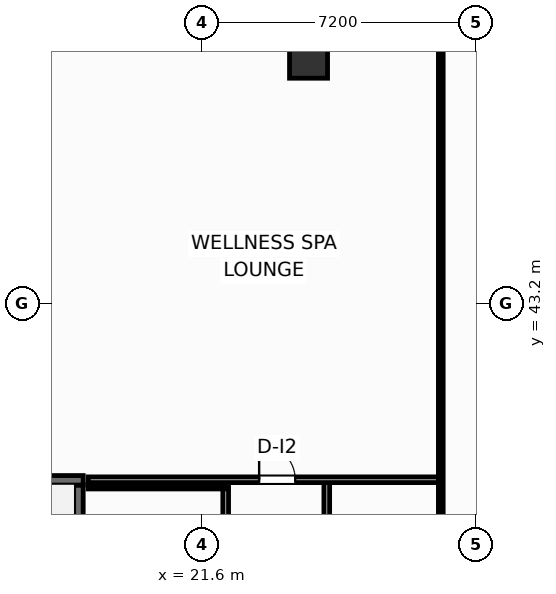
"""IFC4 building model, lengths in metres.
Left out: names, types, materials, properties, quantities, classifications, styles, units other than length and angle.
Written with IfcOpenShell. Run it as: python <this file> out.ifc"""

import sys

from ifc_helpers import new_model, si_unit, direction, frame, frame_2d, origin, origin_2d, place, context, subcontext, project, spatial, rectangle, extrude, element, fill, save


model = new_model("IFC4")
c1 = context("Model", 3, precision=1e-05, world=origin(), true_north=direction((0.0, 1.0)))
c2 = subcontext(c1, "Body", "Model", "MODEL_VIEW")
j1 = project(units=[si_unit("LENGTHUNIT", "METRE"), si_unit("PLANEANGLEUNIT", "RADIAN")], contexts=[c1])
p1 = place(None, origin())
s1 = spatial("IfcSite", under=j1, at=p1, CompositionType="ELEMENT")
p2 = place(p1, origin())
s2 = spatial("IfcBuilding", under=s1, at=p2, CompositionType="ELEMENT")
p3 = place(p2, frame((0.0, 0.0, 16.2)))
s3 = spatial("IfcBuildingStorey", under=s2, at=p3, CompositionType="ELEMENT", Elevation=16.2)
p4 = place(p3, frame((18.345, 29.2, 0.0), z_axis=(0.0, 0.0, 1.0), x_axis=(0.0, 1.0, 0.0)))
e1 = element("IfcWall", 1, at=p4, inside=s3, PredefinedType="SHEAR", context=c2, shape_type="SweptSolid", body=[
    extrude(rectangle(XDim=9.22, YDim=0.25, at=frame_2d((4.61, 0.0))), origin(), (0.0, 0.0, 1.0), 5.08),
])
p5 = place(p4, frame((0.65, 0.0, 0.0)))
e2 = element("IfcOpeningElement", 2, at=p5, cuts=e1, PredefinedType="OPENING", context=c2, shape_type="SweptSolid", body=[
    extrude(rectangle(XDim=1.05, YDim=2.15, at=frame_2d((0.525, 1.075))), frame((0.0, 0.135, 0.0), z_axis=(0.0, -1.0, 0.0), x_axis=(1.0, 0.0, 0.0)), (0.0, 0.0, 1.0), 0.27),
])
p6 = place(p3, frame((14.58, 38.545, 0.0), z_axis=(0.0, 0.0, 1.0), x_axis=(1.0, 0.0, 0.0)))
e3 = element("IfcWall", 3, at=p6, inside=s3, PredefinedType="SHEAR", context=c2, shape_type="SweptSolid", body=[
    extrude(rectangle(XDim=3.89, YDim=0.25, at=frame_2d((1.945, 0.0))), origin(), (0.0, 0.0, 1.0), 5.08),
])
p7 = place(p3, frame((24.4, 49.8, 0.0), z_axis=(0.0, 0.0, 1.0), x_axis=(1.0, 0.0, 0.0)))
e4 = element("IfcColumn", 4, at=p7, inside=s3, PredefinedType="COLUMN", context=c2, shape_type="SweptSolid", body=[
    extrude(rectangle(XDim=1.0, YDim=1.35, at=origin_2d()), origin(), (0.0, 0.0, 1.0), 5.4),
])
p8 = place(p3, frame((24.88, 28.98, 0.0), z_axis=(0.0, 0.0, 1.0), x_axis=(0.0, 1.0, 0.0)))
e5 = element("IfcWall", 5, at=p8, inside=s3, PredefinedType="PARTITIONING", context=c2, shape_type="SweptSolid", body=[
    extrude(rectangle(XDim=9.58, YDim=0.15, at=frame_2d((4.79, 0.0))), origin(), (0.0, 0.0, 1.0), 5.08),
])
p9 = place(p3, frame((22.22, 29.08, 0.0), z_axis=(0.0, 0.0, 1.0), x_axis=(0.0, 1.0, 0.0)))
e6 = element("IfcWall", 6, at=p9, inside=s3, PredefinedType="PARTITIONING", context=c2, shape_type="SweptSolid", body=[
    extrude(rectangle(XDim=9.3, YDim=0.15, at=frame_2d((4.65, 0.0))), origin(), (0.0, 0.0, 1.0), 5.08),
])
p10 = place(p9, frame((1.0, 0.0, 0.0)))
e7 = element("IfcOpeningElement", 7, at=p10, cuts=e6, PredefinedType="OPENING", context=c2, shape_type="SweptSolid", body=[
    extrude(rectangle(XDim=0.9, YDim=2.05, at=frame_2d((0.45, 1.025))), frame((0.0, 0.085, 0.0), z_axis=(0.0, -1.0, 0.0), x_axis=(1.0, 0.0, 0.0)), (0.0, 0.0, 1.0), 0.17),
])
p11 = place(p9, frame((4.1, 0.0, 0.0)))
e8 = element("IfcOpeningElement", 8, at=p11, cuts=e6, PredefinedType="OPENING", context=c2, shape_type="SweptSolid", body=[
    extrude(rectangle(XDim=0.9, YDim=2.05, at=frame_2d((0.45, 1.025))), frame((0.0, 0.085, 0.0), z_axis=(0.0, -1.0, 0.0), x_axis=(1.0, 0.0, 0.0)), (0.0, 0.0, 1.0), 0.17),
])
p12 = place(p9, frame((7.15, 0.0, 0.0)))
e9 = element("IfcOpeningElement", 9, at=p12, cuts=e6, PredefinedType="OPENING", context=c2, shape_type="SweptSolid", body=[
    extrude(rectangle(XDim=0.9, YDim=2.05, at=frame_2d((0.45, 1.025))), frame((0.0, 0.085, 0.0), z_axis=(0.0, -1.0, 0.0), x_axis=(1.0, 0.0, 0.0)), (0.0, 0.0, 1.0), 0.17),
])
p13 = place(p3, frame((18.6, 38.38, 0.0), z_axis=(0.0, 0.0, 1.0), x_axis=(1.0, 0.0, 0.0)))
e10 = element("IfcWall", 10, at=p13, inside=s3, PredefinedType="PARTITIONING", context=c2, shape_type="SweptSolid", body=[
    extrude(rectangle(XDim=3.62, YDim=0.125, at=frame_2d((1.81, 0.0))), origin(), (0.0, 0.0, 1.0), 5.08),
])
p14 = place(p3, frame((18.6, 38.56, 0.0), z_axis=(0.0, 0.0, 1.0), x_axis=(1.0, 0.0, 0.0)))
e11 = element("IfcWall", 11, at=p14, inside=s3, PredefinedType="PARTITIONING", context=c2, shape_type="SweptSolid", body=[
    extrude(rectangle(XDim=9.28, YDim=0.15, at=frame_2d((4.64, 0.0))), origin(), (0.0, 0.0, 1.0), 5.08),
])
p15 = place(p14, frame((4.5, 0.0, 0.0)))
e12 = element("IfcOpeningElement", 12, at=p15, cuts=e11, PredefinedType="OPENING", context=c2, shape_type="SweptSolid", body=[
    extrude(rectangle(XDim=0.95, YDim=2.05, at=frame_2d((0.475, 1.025))), frame((0.0, 0.085, 0.0), z_axis=(0.0, -1.0, 0.0), x_axis=(1.0, 0.0, 0.0)), (0.0, 0.0, 1.0), 0.17),
])
p16 = place(p3, frame((27.88, 36.02, 0.0), z_axis=(0.0, 0.0, 1.0), x_axis=(0.0, 1.0, 0.0)))
e13 = element("IfcWall", 13, at=p16, inside=s3, PredefinedType="PARTITIONING", context=c2, shape_type="SweptSolid", body=[
    extrude(rectangle(XDim=14.18, YDim=0.125, at=frame_2d((7.09, 0.0))), origin(), (0.0, 0.0, 1.0), 5.08),
])
p17 = place(p15, origin())
e14 = element("IfcDoor", 14, at=p17, inside=s3, OperationType="SINGLE_SWING_LEFT", PredefinedType="DOOR", context=c2, shape_type="SweptSolid", body=[
    extrude(rectangle(XDim=0.95, YDim=2.05, at=frame_2d((0.475, 1.025))), frame((0.0, 0.025, 0.0), z_axis=(0.0, -1.0, 0.0), x_axis=(1.0, 0.0, 0.0)), (0.0, 0.0, 1.0), 0.05),
])
fill(e12, e14)
save(model, sys.argv[1])
